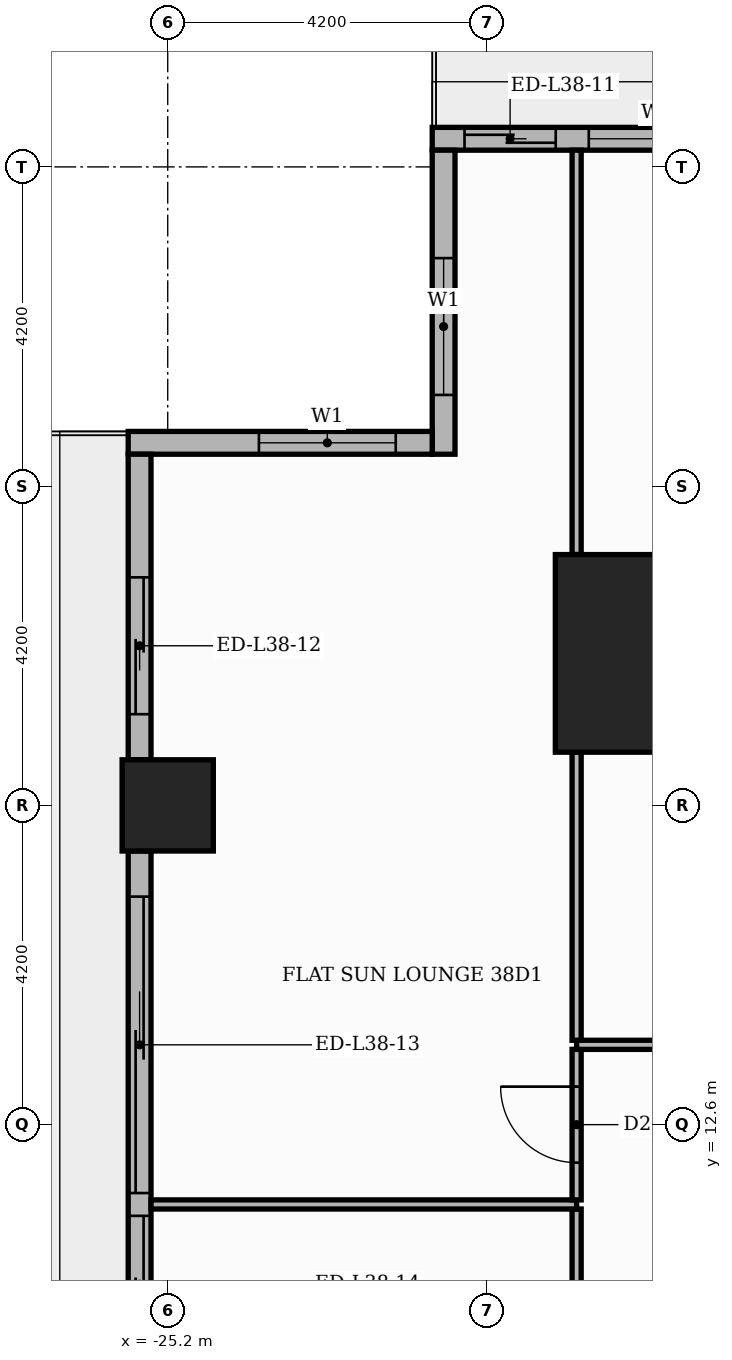
"""IFC4 building model, lengths in metres.
Left out: names, types, materials, properties, quantities, classifications, styles, units other than length and angle.
Written with IfcOpenShell. Run it as: python <this file> out.ifc"""

import sys

from ifc_helpers import new_model, si_unit, direction, frame, frame_2d, origin, origin_2d, place, context, subcontext, project, spatial, rectangle, extrude, element, fill, save


model = new_model("IFC4")
c1 = context("Model", 3, precision=1e-05, world=origin(), true_north=direction((0.0, 1.0)))
c2 = subcontext(c1, "Body", "Model", "MODEL_VIEW")
j1 = project(units=[si_unit("LENGTHUNIT", "METRE"), si_unit("PLANEANGLEUNIT", "RADIAN")], contexts=[c1])
p1 = place(None, origin())
s1 = spatial("IfcSite", under=j1, at=p1, CompositionType="ELEMENT")
p2 = place(p1, origin())
s2 = spatial("IfcBuilding", under=s1, at=p2, CompositionType="ELEMENT")
p3 = place(p2, frame((0.0, 0.0, 161.1)))
s3 = spatial("IfcBuildingStorey", under=s2, at=p3, CompositionType="ELEMENT", Elevation=161.1)
p4 = place(p3, frame((-18.8, 18.8, 0.0), z_axis=(0.0, 0.0, 1.0), x_axis=(1.0, 0.0, 0.0)))
e1 = element("IfcColumn", 1, at=p4, inside=s3, PredefinedType="COLUMN", context=c2, shape_type="SweptSolid", body=[
    extrude(rectangle(XDim=2.6, YDim=2.6, at=origin_2d()), origin(), (0.0, 0.0, 1.0), 3.9),
])
p5 = place(p3, frame((-25.2, 16.8, 0.0), z_axis=(0.0, 0.0, 1.0), x_axis=(1.0, 0.0, 0.0)))
e2 = element("IfcColumn", 2, at=p5, inside=s3, PredefinedType="COLUMN", context=c2, shape_type="SweptSolid", body=[
    extrude(rectangle(XDim=1.2, YDim=1.2, at=origin_2d()), origin(), (0.0, 0.0, 1.0), 3.9),
])
p6 = place(p3, frame((-17.4, 25.57, 0.0), z_axis=(0.0, 0.0, 1.0), x_axis=(-1.0, 0.0, 0.0)))
e3 = element("IfcWall", 3, at=p6, inside=s3, PredefinedType="STANDARD", context=c2, shape_type="SweptSolid", body=[
    extrude(rectangle(XDim=4.32, YDim=0.3, at=frame_2d((2.16, 0.0))), origin(), (0.0, 0.0, 1.0), 3.48),
])
p7 = place(p6, frame((2.695, 0.0, 0.0)))
e4 = element("IfcOpeningElement", 4, at=p7, cuts=e3, PredefinedType="OPENING", context=c2, shape_type="SweptSolid", body=[
    extrude(rectangle(XDim=1.2, YDim=2.4, at=frame_2d((0.6, 1.2))), frame((0.0, 0.16, 0.0), z_axis=(0.0, -1.0, 0.0), x_axis=(1.0, 0.0, 0.0)), (0.0, 0.0, 1.0), 0.32),
])
p8 = place(p6, frame((0.46, 0.0, 0.9)))
e5 = element("IfcOpeningElement", 5, at=p8, cuts=e3, PredefinedType="OPENING", context=c2, shape_type="SweptSolid", body=[
    extrude(rectangle(XDim=1.8, YDim=2.1, at=frame_2d((0.9, 1.05))), frame((0.0, 0.16, 0.0), z_axis=(0.0, -1.0, 0.0), x_axis=(1.0, 0.0, 0.0)), (0.0, 0.0, 1.0), 0.32),
])
p9 = place(p3, frame((-21.57, 25.42, 0.0), z_axis=(0.0, 0.0, 1.0), x_axis=(0.0, -1.0, 0.0)))
e6 = element("IfcWall", 6, at=p9, inside=s3, PredefinedType="STANDARD", context=c2, shape_type="SweptSolid", body=[
    extrude(rectangle(XDim=4.0, YDim=0.3, at=frame_2d((2.0, 0.0))), origin(), (0.0, 0.0, 1.0), 3.48),
])
p10 = place(p9, frame((1.42, 0.0, 0.9)))
e7 = element("IfcOpeningElement", 7, at=p10, cuts=e6, PredefinedType="OPENING", context=c2, shape_type="SweptSolid", body=[
    extrude(rectangle(XDim=1.8, YDim=2.1, at=frame_2d((0.9, 1.05))), frame((0.0, 0.16, 0.0), z_axis=(0.0, -1.0, 0.0), x_axis=(1.0, 0.0, 0.0)), (0.0, 0.0, 1.0), 0.32),
])
p11 = place(p3, frame((-21.72, 21.57, 0.0), z_axis=(0.0, 0.0, 1.0), x_axis=(-1.0, 0.0, 0.0)))
e8 = element("IfcWall", 8, at=p11, inside=s3, PredefinedType="STANDARD", context=c2, shape_type="SweptSolid", body=[
    extrude(rectangle(XDim=4.0, YDim=0.3, at=frame_2d((2.0, 0.0))), origin(), (0.0, 0.0, 1.0), 3.48),
])
p12 = place(p11, frame((0.48, 0.0, 0.9)))
e9 = element("IfcOpeningElement", 9, at=p12, cuts=e8, PredefinedType="OPENING", context=c2, shape_type="SweptSolid", body=[
    extrude(rectangle(XDim=1.8, YDim=2.1, at=frame_2d((0.9, 1.05))), frame((0.0, 0.16, 0.0), z_axis=(0.0, -1.0, 0.0), x_axis=(1.0, 0.0, 0.0)), (0.0, 0.0, 1.0), 0.32),
])
p13 = place(p3, frame((-25.57, 21.42, 0.0), z_axis=(0.0, 0.0, 1.0), x_axis=(0.0, -1.0, 0.0)))
e10 = element("IfcWall", 10, at=p13, inside=s3, PredefinedType="STANDARD", context=c2, shape_type="SweptSolid", body=[
    extrude(rectangle(XDim=4.02, YDim=0.3, at=frame_2d((2.01, 0.0))), origin(), (0.0, 0.0, 1.0), 3.48),
])
p14 = place(p13, frame((1.62, 0.0, 0.0)))
e11 = element("IfcOpeningElement", 11, at=p14, cuts=e10, PredefinedType="OPENING", context=c2, shape_type="SweptSolid", body=[
    extrude(rectangle(XDim=1.8, YDim=2.4, at=frame_2d((0.9, 1.2))), frame((0.0, 0.16, 0.0), z_axis=(0.0, -1.0, 0.0), x_axis=(1.0, 0.0, 0.0)), (0.0, 0.0, 1.0), 0.32),
])
p15 = place(p3, frame((-25.57, 16.2, 0.0), z_axis=(0.0, 0.0, 1.0), x_axis=(0.0, -1.0, 0.0)))
e12 = element("IfcWall", 12, at=p15, inside=s3, PredefinedType="STANDARD", context=c2, shape_type="SweptSolid", body=[
    extrude(rectangle(XDim=7.2, YDim=0.3, at=frame_2d((3.6, 0.0))), origin(), (0.0, 0.0, 1.0), 3.48),
])
p16 = place(p15, frame((0.6, 0.0, 0.0)))
e13 = element("IfcOpeningElement", 13, at=p16, cuts=e12, PredefinedType="OPENING", context=c2, shape_type="SweptSolid", body=[
    extrude(rectangle(XDim=3.9, YDim=2.4, at=frame_2d((1.95, 1.2))), frame((0.0, 0.16, 0.0), z_axis=(0.0, -1.0, 0.0), x_axis=(1.0, 0.0, 0.0)), (0.0, 0.0, 1.0), 0.32),
])
p17 = place(p15, frame((4.8, 0.0, 0.0)))
e14 = element("IfcOpeningElement", 14, at=p17, cuts=e12, PredefinedType="OPENING", context=c2, shape_type="SweptSolid", body=[
    extrude(rectangle(XDim=1.8, YDim=2.4, at=frame_2d((0.9, 1.2))), frame((0.0, 0.16, 0.0), z_axis=(0.0, -1.0, 0.0), x_axis=(1.0, 0.0, 0.0)), (0.0, 0.0, 1.0), 0.32),
])
p18 = place(p3, frame((-19.82, 3.21, 0.0), z_axis=(0.0, 0.0, 1.0), x_axis=(0.0, 1.0, 0.0)))
e15 = element("IfcWall", 15, at=p18, inside=s3, PredefinedType="PARTITIONING", context=c2, shape_type="SweptSolid", body=[
    extrude(rectangle(XDim=8.28, YDim=0.12, at=frame_2d((4.14, 0.0))), origin(), (0.0, 0.0, 1.0), 3.48),
])
p19 = place(p18, frame((3.64, 0.0, 0.0)))
e16 = element("IfcOpeningElement", 16, at=p19, cuts=e15, PredefinedType="OPENING", context=c2, shape_type="SweptSolid", body=[
    extrude(rectangle(XDim=1.0, YDim=2.1, at=frame_2d((0.5, 1.05))), frame((0.0, 0.07, 0.0), z_axis=(0.0, -1.0, 0.0), x_axis=(1.0, 0.0, 0.0)), (0.0, 0.0, 1.0), 0.14),
])
p20 = place(p3, frame((-25.42, 11.55, 0.0), z_axis=(0.0, 0.0, 1.0), x_axis=(1.0, 0.0, 0.0)))
e17 = element("IfcWall", 17, at=p20, inside=s3, PredefinedType="PARTITIONING", context=c2, shape_type="SweptSolid", body=[
    extrude(rectangle(XDim=5.6, YDim=0.12, at=frame_2d((2.8, 0.0))), origin(), (0.0, 0.0, 1.0), 3.48),
])
p21 = place(p3, frame((-19.82, 11.61, 0.0), z_axis=(0.0, 0.0, 1.0), x_axis=(0.0, 1.0, 0.0)))
e18 = element("IfcWall", 18, at=p21, inside=s3, PredefinedType="PARTITIONING", context=c2, shape_type="SweptSolid", body=[
    extrude(rectangle(XDim=1.98, YDim=0.12, at=frame_2d((0.99, 0.0))), origin(), (0.0, 0.0, 1.0), 3.48),
])
p22 = place(p21, frame((0.49, 0.0, 0.0)))
e19 = element("IfcOpeningElement", 19, at=p22, cuts=e18, PredefinedType="OPENING", context=c2, shape_type="SweptSolid", body=[
    extrude(rectangle(XDim=1.0, YDim=2.1, at=frame_2d((0.5, 1.05))), frame((0.0, 0.07, 0.0), z_axis=(0.0, -1.0, 0.0), x_axis=(1.0, 0.0, 0.0)), (0.0, 0.0, 1.0), 0.14),
])
p23 = place(p3, frame((-19.82, 13.65, 0.0), z_axis=(0.0, 0.0, 1.0), x_axis=(1.0, 0.0, 0.0)))
e20 = element("IfcWall", 20, at=p23, inside=s3, PredefinedType="PARTITIONING", context=c2, shape_type="SweptSolid", body=[
    extrude(rectangle(XDim=6.17, YDim=0.12, at=frame_2d((3.085, 0.0))), origin(), (0.0, 0.0, 1.0), 3.48),
])
p24 = place(p23, frame((2.635, 0.0, 0.0)))
e21 = element("IfcOpeningElement", 21, at=p24, cuts=e20, PredefinedType="OPENING", context=c2, shape_type="SweptSolid", body=[
    extrude(rectangle(XDim=0.9, YDim=2.1, at=frame_2d((0.45, 1.05))), frame((0.0, 0.07, 0.0), z_axis=(0.0, -1.0, 0.0), x_axis=(1.0, 0.0, 0.0)), (0.0, 0.0, 1.0), 0.14),
])
p25 = place(p3, frame((-19.82, 13.71, 0.0), z_axis=(0.0, 0.0, 1.0), x_axis=(0.0, 1.0, 0.0)))
e22 = element("IfcWall", 22, at=p25, inside=s3, PredefinedType="PARTITIONING", context=c2, shape_type="SweptSolid", body=[
    extrude(rectangle(XDim=3.79, YDim=0.12, at=frame_2d((1.895, 0.0))), origin(), (0.0, 0.0, 1.0), 3.48),
])
p26 = place(p3, frame((-19.82, 20.1, 0.0), z_axis=(0.0, 0.0, 1.0), x_axis=(0.0, 1.0, 0.0)))
e23 = element("IfcWall", 23, at=p26, inside=s3, PredefinedType="PARTITIONING", context=c2, shape_type="SweptSolid", body=[
    extrude(rectangle(XDim=5.32, YDim=0.12, at=frame_2d((2.66, 0.0))), origin(), (0.0, 0.0, 1.0), 3.48),
])
p27 = place(p7, origin())
e24 = element("IfcDoor", 24, at=p27, inside=s3, OperationType="SLIDING_TO_LEFT", PredefinedType="DOOR", context=c2, shape_type="SweptSolid", body=[
    extrude(rectangle(XDim=1.2, YDim=2.4, at=frame_2d((0.6, 1.2))), frame((0.0, 0.025, 0.0), z_axis=(0.0, -1.0, 0.0), x_axis=(1.0, 0.0, 0.0)), (0.0, 0.0, 1.0), 0.05),
])
fill(e4, e24)
p28 = place(p8, origin())
e25 = element("IfcWindow", 25, at=p28, inside=s3, PartitioningType="SINGLE_PANEL", PredefinedType="WINDOW", context=c2, shape_type="SweptSolid", body=[
    extrude(rectangle(XDim=1.8, YDim=2.1, at=frame_2d((0.9, 1.05))), frame((0.0, 0.03, 0.0), z_axis=(0.0, -1.0, 0.0), x_axis=(1.0, 0.0, 0.0)), (0.0, 0.0, 1.0), 0.06),
])
fill(e5, e25)
p29 = place(p10, origin())
e26 = element("IfcWindow", 26, at=p29, inside=s3, PartitioningType="SINGLE_PANEL", PredefinedType="WINDOW", context=c2, shape_type="SweptSolid", body=[
    extrude(rectangle(XDim=1.8, YDim=2.1, at=frame_2d((0.9, 1.05))), frame((0.0, 0.03, 0.0), z_axis=(0.0, -1.0, 0.0), x_axis=(1.0, 0.0, 0.0)), (0.0, 0.0, 1.0), 0.06),
])
fill(e7, e26)
p30 = place(p12, origin())
e27 = element("IfcWindow", 27, at=p30, inside=s3, PartitioningType="SINGLE_PANEL", PredefinedType="WINDOW", context=c2, shape_type="SweptSolid", body=[
    extrude(rectangle(XDim=1.8, YDim=2.1, at=frame_2d((0.9, 1.05))), frame((0.0, 0.03, 0.0), z_axis=(0.0, -1.0, 0.0), x_axis=(1.0, 0.0, 0.0)), (0.0, 0.0, 1.0), 0.06),
])
fill(e9, e27)
p31 = place(p14, origin())
e28 = element("IfcDoor", 28, at=p31, inside=s3, OperationType="SLIDING_TO_RIGHT", PredefinedType="DOOR", context=c2, shape_type="SweptSolid", body=[
    extrude(rectangle(XDim=1.8, YDim=2.4, at=frame_2d((0.9, 1.2))), frame((0.0, 0.025, 0.0), z_axis=(0.0, -1.0, 0.0), x_axis=(1.0, 0.0, 0.0)), (0.0, 0.0, 1.0), 0.05),
])
fill(e11, e28)
p32 = place(p16, origin())
e29 = element("IfcDoor", 29, at=p32, inside=s3, OperationType="SLIDING_TO_LEFT", PredefinedType="DOOR", context=c2, shape_type="SweptSolid", body=[
    extrude(rectangle(XDim=3.9, YDim=2.4, at=frame_2d((1.95, 1.2))), frame((0.0, 0.025, 0.0), z_axis=(0.0, -1.0, 0.0), x_axis=(1.0, 0.0, 0.0)), (0.0, 0.0, 1.0), 0.05),
])
fill(e13, e29)
p33 = place(p17, origin())
e30 = element("IfcDoor", 30, at=p33, inside=s3, OperationType="SLIDING_TO_RIGHT", PredefinedType="DOOR", context=c2, shape_type="SweptSolid", body=[
    extrude(rectangle(XDim=1.8, YDim=2.4, at=frame_2d((0.9, 1.2))), frame((0.0, 0.025, 0.0), z_axis=(0.0, -1.0, 0.0), x_axis=(1.0, 0.0, 0.0)), (0.0, 0.0, 1.0), 0.05),
])
fill(e14, e30)
p34 = place(p22, origin())
e31 = element("IfcDoor", 31, at=p34, inside=s3, OperationType="SINGLE_SWING_RIGHT", PredefinedType="DOOR", context=c2, shape_type="SweptSolid", body=[
    extrude(rectangle(XDim=1.0, YDim=2.1, at=frame_2d((0.5, 1.05))), frame((0.0, 0.025, 0.0), z_axis=(0.0, -1.0, 0.0), x_axis=(1.0, 0.0, 0.0)), (0.0, 0.0, 1.0), 0.05),
])
fill(e19, e31)
save(model, sys.argv[1])
